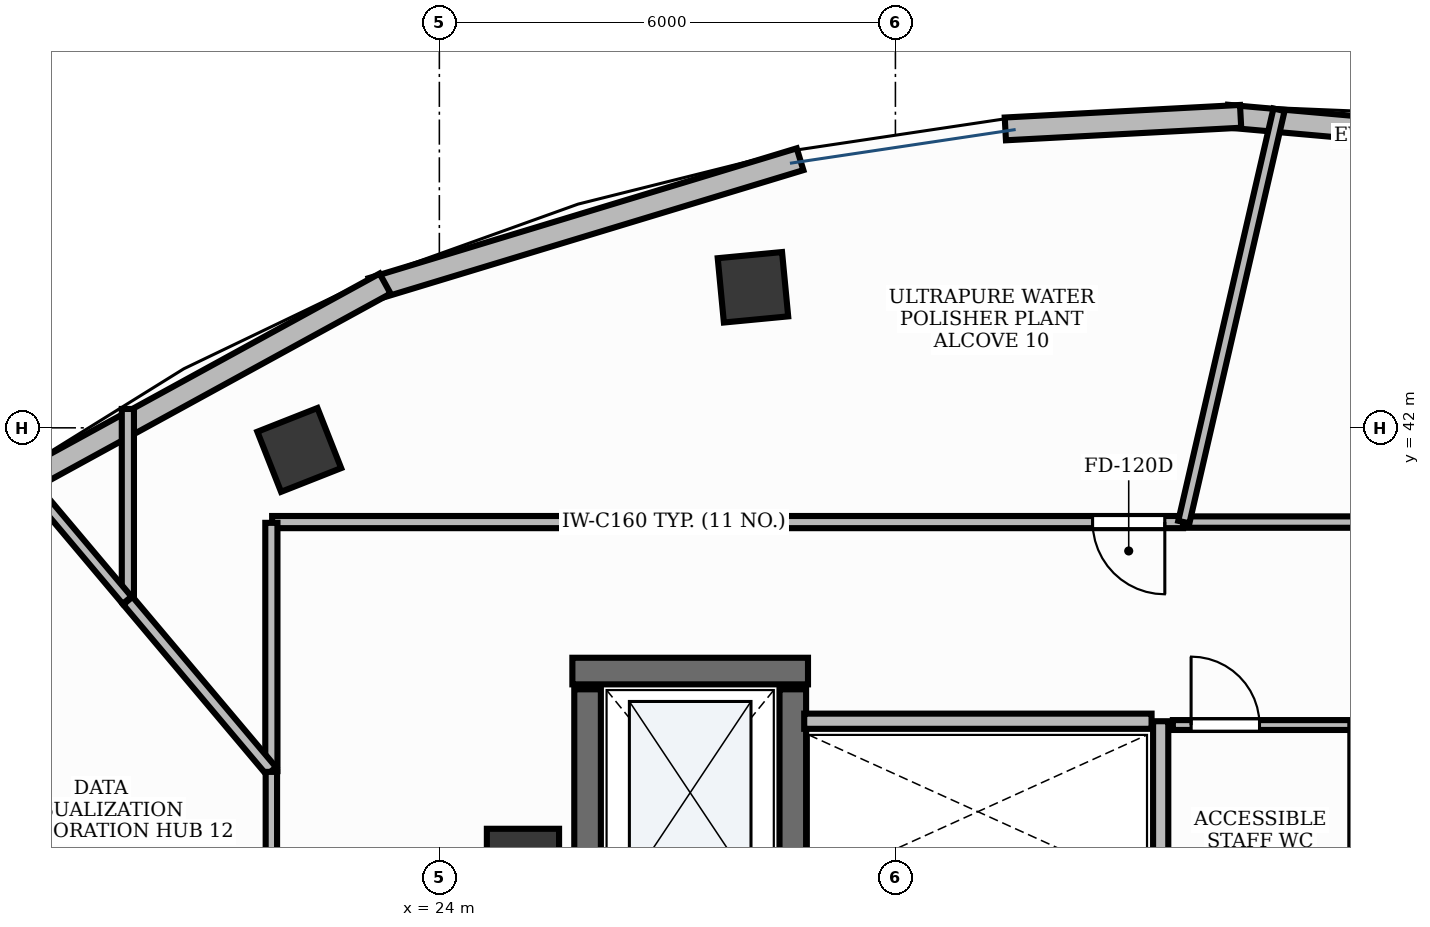
"""IFC4 building model, lengths in metres.
Left out: names, types, materials, properties, quantities, classifications, styles, units other than length and angle.
Written with IfcOpenShell. Run it as: python <this file> out.ifc"""

import sys

from ifc_helpers import new_model, si_unit, direction, frame, frame_2d, origin, origin_2d, place, context, subcontext, project, spatial, rectangle, extrude, element, fill, save


model = new_model("IFC4")
c1 = context("Model", 3, precision=1e-05, world=origin(), true_north=direction((0.0, 1.0)))
c2 = subcontext(c1, "Body", "Model", "MODEL_VIEW")
j1 = project(units=[si_unit("LENGTHUNIT", "METRE"), si_unit("PLANEANGLEUNIT", "RADIAN")], contexts=[c1])
p1 = place(None, origin())
s1 = spatial("IfcSite", under=j1, at=p1, CompositionType="ELEMENT")
p2 = place(p1, origin())
s2 = spatial("IfcBuilding", under=s1, at=p2, CompositionType="ELEMENT")
p3 = place(p2, frame((0.0, 0.0, 282.6)))
s3 = spatial("IfcBuildingStorey", under=s2, at=p3, CompositionType="ELEMENT", Elevation=282.6)
p4 = place(p3, frame((25.75, 38.8, 0.0), z_axis=(0.0, 0.0, 1.0), x_axis=(1.0, 0.0, 0.0)))
e1 = element("IfcWall", 1, at=p4, inside=s3, PredefinedType="SHEAR", context=c2, shape_type="SweptSolid", body=[
    extrude(rectangle(XDim=3.1, YDim=0.35, at=frame_2d((1.55, 0.0))), origin(), (0.0, 0.0, 1.0), 3.79),
])
for number, where, z_axis, x_axis in (
    (2, (25.95, 35.86, 0.0), (0.0, 0.0, 1.0), (0.0, 1.0, 0.0)),
    (3, (28.65, 35.86, 0.0), (0.0, 0.0, 1.0), (0.0, 1.0, 0.0)),
):
    element("IfcWall", number, at=place(p3, frame(where, z_axis=z_axis, x_axis=x_axis)), inside=s3, PredefinedType="SHEAR", context=c2, shape_type="SweptSolid", body=[
        extrude(rectangle(XDim=2.7, YDim=0.35, at=frame_2d((1.35, 0.0))), origin(), (0.0, 0.0, 1.0), 3.79),
    ])
p5 = place(p3, frame((25.1, 36.25, -0.0), z_axis=(0.0, 0.0, 1.0), x_axis=(1.0, 0.0, 0.0)))
e4 = element("IfcColumn", 4, at=p5, inside=s3, PredefinedType="PILASTER", context=c2, shape_type="SweptSolid", body=[
    extrude(rectangle(XDim=0.95, YDim=0.95, at=origin_2d()), origin(), (0.0, 0.0, 1.0), 3.791),
])
for number, where, z_axis, x_axis in (
    (5, (28.126, 43.849, -0.0), (0.0, 0.0, 1.0), (0.995, 0.095, 0.0)),
    (6, (22.157, 41.709, -0.0), (0.0, 0.0, 1.0), (0.93, 0.367, 0.0)),
):
    element("IfcColumn", number, at=place(p3, frame(where, z_axis=z_axis, x_axis=x_axis)), inside=s3, PredefinedType="COLUMN", context=c2, shape_type="SweptSolid", body=[
        extrude(rectangle(XDim=0.85, YDim=0.85, at=origin_2d()), origin(), (0.0, 0.0, 1.0), 3.791),
    ])
p6 = place(p3, frame((40.358, 45.569, 0.0), z_axis=(0.0, 0.0, 1.0), x_axis=(-0.99608733171, 0.088374360578, 0.0)))
e7 = element("IfcWall", 7, at=p6, inside=s3, PredefinedType="STANDARD", context=c2, shape_type="SweptSolid", body=[
    extrude(rectangle(XDim=6.02, YDim=0.3, at=frame_2d((3.01, 0.0))), origin(), (0.0, 0.0, 1.0), 3.36),
])
p7 = place(p3, frame((34.542, 46.098, 0.0), z_axis=(0.0, 0.0, 1.0), x_axis=(-0.998577283854, -0.053323617382, 0.0)))
e8 = element("IfcWall", 8, at=p7, inside=s3, PredefinedType="STANDARD", context=c2, shape_type="SweptSolid", body=[
    extrude(rectangle(XDim=3.1, YDim=0.3, at=frame_2d((1.55, 0.0))), origin(), (0.0, 0.0, 1.0), 3.36),
])
p8 = place(p3, frame((28.745, 45.534, 0.0), z_axis=(0.0, 0.0, 1.0), x_axis=(-0.95696124157, -0.290215751008, 0.0)))
e9 = element("IfcWall", 9, at=p8, inside=s3, PredefinedType="STANDARD", context=c2, shape_type="SweptSolid", body=[
    extrude(rectangle(XDim=5.886, YDim=0.3, at=frame_2d((2.943, 0.0))), origin(), (0.0, 0.0, 1.0), 3.79),
])
p9 = place(p3, frame((23.286, 43.898, 0.0), z_axis=(0.0, 0.0, 1.0), x_axis=(-0.877062479499, -0.480376318166, 0.0)))
e10 = element("IfcWall", 10, at=p9, inside=s3, PredefinedType="STANDARD", context=c2, shape_type="SweptSolid", body=[
    extrude(rectangle(XDim=5.654, YDim=0.3, at=frame_2d((2.827, 0.0))), origin(), (0.0, 0.0, 1.0), 3.79),
])
p10 = place(p3, frame((33.49, 35.76, 0.0), z_axis=(0.0, 0.0, 1.0), x_axis=(0.0, 1.0, 0.0)))
e11 = element("IfcWall", 11, at=p10, inside=s3, PredefinedType="PARTITIONING", context=c2, shape_type="SweptSolid", body=[
    extrude(rectangle(XDim=2.38, YDim=0.2, at=frame_2d((1.19, 0.0))), origin(), (0.0, 0.0, 1.0), 2.8),
])
p11 = place(p3, frame((28.8, 38.14, 0.0), z_axis=(0.0, 0.0, 1.0), x_axis=(1.0, 0.0, 0.0)))
e12 = element("IfcWall", 12, at=p11, inside=s3, PredefinedType="PARTITIONING", context=c2, shape_type="SweptSolid", body=[
    extrude(rectangle(XDim=4.57, YDim=0.2, at=frame_2d((2.285, 0.0))), origin(), (0.0, 0.0, 1.0), 2.8),
])
p12 = place(p3, frame((33.65, 38.09, 0.0), z_axis=(0.0, 0.0, 1.0), x_axis=(1.0, 0.0, 0.0)))
e13 = element("IfcWall", 13, at=p12, inside=s3, PredefinedType="PARTITIONING", context=c2, shape_type="SweptSolid", body=[
    extrude(rectangle(XDim=2.4, YDim=0.13, at=frame_2d((1.2, 0.0))), origin(), (0.0, 0.0, 1.0), 2.8),
])
p13 = place(p12, frame((0.24, 0.0, 0.0)))
e14 = element("IfcOpeningElement", 14, at=p13, cuts=e13, PredefinedType="OPENING", context=c2, shape_type="SweptSolid", body=[
    extrude(rectangle(XDim=0.9, YDim=2.15, at=frame_2d((0.45, 1.075))), frame((0.0, 0.08, 0.0), z_axis=(0.0, -1.0, 0.0), x_axis=(1.0, 0.0, 0.0)), (0.0, 0.0, 1.0), 0.16),
])
p14 = place(p3, frame((39.4, 40.76, 0.0), z_axis=(0.0, 0.0, 1.0), x_axis=(-1.0, 0.0, 0.0)))
e15 = element("IfcWall", 15, at=p14, inside=s3, PredefinedType="PARTITIONING", context=c2, shape_type="SweptSolid", body=[
    extrude(rectangle(XDim=5.606, YDim=0.15, at=frame_2d((2.803, 0.0))), origin(), (0.0, 0.0, 1.0), 2.8),
])
p15 = place(p14, frame((1.428, 0.0, 0.0)))
e16 = element("IfcOpeningElement", 16, at=p15, cuts=e15, PredefinedType="OPENING", context=c2, shape_type="SweptSolid", body=[
    extrude(rectangle(XDim=0.95, YDim=2.15, at=frame_2d((0.475, 1.075))), frame((0.0, 0.09, 0.0), z_axis=(0.0, -1.0, 0.0), x_axis=(1.0, 0.0, 0.0)), (0.0, 0.0, 1.0), 0.18),
])
p16 = place(p3, frame((33.784, 40.76, 0.0), z_axis=(0.0, 0.0, 1.0), x_axis=(-1.0, 0.0, 0.0)))
e17 = element("IfcWall", 17, at=p16, inside=s3, PredefinedType="PARTITIONING", context=c2, shape_type="SweptSolid", body=[
    extrude(rectangle(XDim=11.984, YDim=0.16, at=frame_2d((5.992, 0.0))), origin(), (0.0, 0.0, 1.0), 2.8),
])
p17 = place(p16, frame((0.24, 0.0, 0.0)))
e18 = element("IfcOpeningElement", 18, at=p17, cuts=e17, PredefinedType="OPENING", context=c2, shape_type="SweptSolid", body=[
    extrude(rectangle(XDim=0.95, YDim=2.15, at=frame_2d((0.475, 1.075))), frame((0.0, 0.095, 0.0), z_axis=(0.0, -1.0, 0.0), x_axis=(1.0, 0.0, 0.0)), (0.0, 0.0, 1.0), 0.19),
])
p18 = place(p3, frame((33.794, 40.76, 0.0), z_axis=(0.0, 0.0, 1.0), x_axis=(0.224974808594, 0.974364580379, 0.0)))
e19 = element("IfcWall", 19, at=p18, inside=s3, PredefinedType="PARTITIONING", context=c2, shape_type="SweptSolid", body=[
    extrude(rectangle(XDim=5.567, YDim=0.15, at=frame_2d((2.784, 0.0))), origin(), (0.0, 0.0, 1.0), 2.8),
])
p19 = place(p3, frame((19.902, 39.726, 0.0), z_axis=(0.0, 0.0, 1.0), x_axis=(0.0, 1.0, 0.0)))
e20 = element("IfcWall", 20, at=p19, inside=s3, PredefinedType="PARTITIONING", context=c2, shape_type="SweptSolid", body=[
    extrude(rectangle(XDim=2.522, YDim=0.16, at=frame_2d((1.261, 0.0))), origin(), (0.0, 0.0, 1.0), 2.8),
])
p20 = place(p3, frame((21.79, 40.75, 0.0), z_axis=(0.0, 0.0, 1.0), x_axis=(0.0, -1.0, 0.0)))
e21 = element("IfcWall", 21, at=p20, inside=s3, PredefinedType="PARTITIONING", context=c2, shape_type="SweptSolid", body=[
    extrude(rectangle(XDim=3.266, YDim=0.16, at=frame_2d((1.633, 0.0))), origin(), (0.0, 0.0, 1.0), 2.8),
])
p21 = place(p3, frame((21.79, 37.484, 0.0), z_axis=(0.0, 0.0, 1.0), x_axis=(-0.644133180728, 0.764913358156, 0.0)))
e22 = element("IfcWall", 22, at=p21, inside=s3, PredefinedType="PARTITIONING", context=c2, shape_type="SweptSolid", body=[
    extrude(rectangle(XDim=2.931, YDim=0.16, at=frame_2d((1.465, 0.0))), origin(), (0.0, 0.0, 1.0), 2.8),
])
p22 = place(p3, frame((18.479, 41.409, 0.0), z_axis=(0.0, 0.0, 1.0), x_axis=(0.644139173412, -0.764908311679, 0.0)))
e23 = element("IfcWall", 23, at=p22, inside=s3, PredefinedType="PARTITIONING", context=c2, shape_type="SweptSolid", body=[
    extrude(rectangle(XDim=2.193, YDim=0.15, at=frame_2d((1.097, 0.0))), origin(), (0.0, 0.0, 1.0), 2.8),
])
p23 = place(p3, frame((21.79, 37.474, 0.0), z_axis=(0.0, 0.0, 1.0), x_axis=(0.0, -1.0, 0.0)))
e24 = element("IfcWall", 24, at=p23, inside=s3, PredefinedType="PARTITIONING", context=c2, shape_type="SweptSolid", body=[
    extrude(rectangle(XDim=2.91, YDim=0.15, at=frame_2d((1.455, 0.0))), origin(), (0.0, 0.0, 1.0), 2.8),
])
p24 = place(p13, origin())
e25 = element("IfcDoor", 25, at=p24, inside=s3, OperationType="SINGLE_SWING_LEFT", PredefinedType="DOOR", context=c2, shape_type="SweptSolid", body=[
    extrude(rectangle(XDim=0.9, YDim=2.15, at=frame_2d((0.45, 1.075))), frame((0.0, 0.025, 0.0), z_axis=(0.0, -1.0, 0.0), x_axis=(1.0, 0.0, 0.0)), (0.0, 0.0, 1.0), 0.05),
])
fill(e14, e25)
p25 = place(p17, origin())
e26 = element("IfcDoor", 26, at=p25, inside=s3, OperationType="SINGLE_SWING_LEFT", PredefinedType="DOOR", context=c2, shape_type="SweptSolid", body=[
    extrude(rectangle(XDim=0.95, YDim=2.15, at=frame_2d((0.475, 1.075))), frame((0.0, 0.025, 0.0), z_axis=(0.0, -1.0, 0.0), x_axis=(1.0, 0.0, 0.0)), (0.0, 0.0, 1.0), 0.05),
])
fill(e18, e26)
save(model, sys.argv[1])
